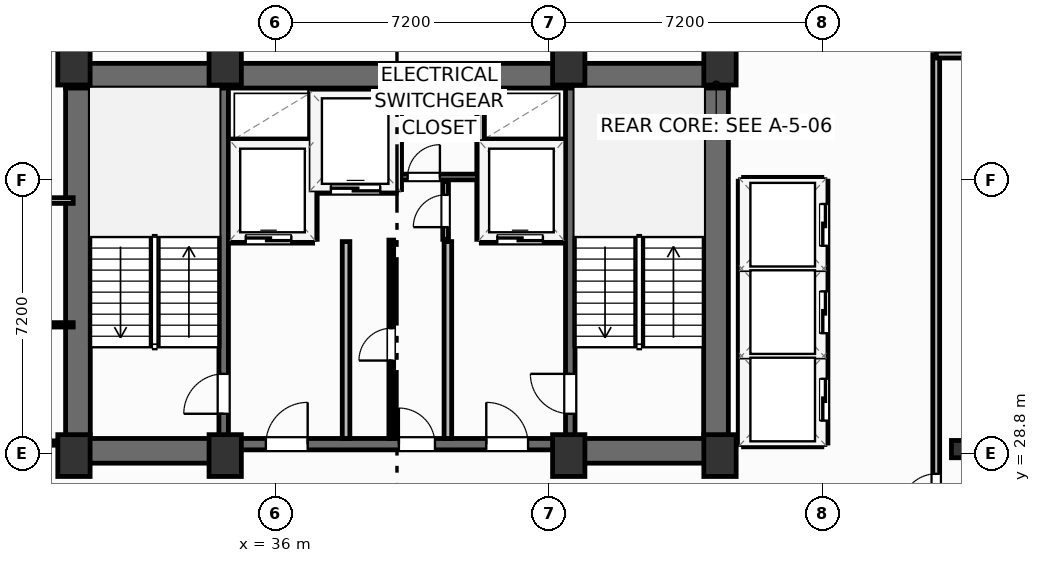
"""IFC4 building model, lengths in metres.
Left out: names, types, materials, properties, quantities, classifications, styles, units other than length and angle.
Written with IfcOpenShell. Run it as: python <this file> out.ifc"""

import sys

from ifc_helpers import new_model, si_unit, direction, frame, frame_2d, origin, origin_2d, place, context, subcontext, project, spatial, rectangle, i_section, extrude, element, fill, save


model = new_model("IFC4")
c1 = context("Model", 3, precision=1e-05, world=origin(), true_north=direction((0.0, 1.0)))
c2 = subcontext(c1, "Body", "Model", "MODEL_VIEW")
j1 = project(units=[si_unit("LENGTHUNIT", "METRE"), si_unit("PLANEANGLEUNIT", "RADIAN")], contexts=[c1])
p1 = place(None, origin())
s1 = spatial("IfcSite", under=j1, at=p1, CompositionType="ELEMENT")
p2 = place(p1, origin())
s2 = spatial("IfcBuilding", under=s1, at=p2, CompositionType="ELEMENT")
p3 = place(p2, frame((0.0, 0.0, 178.3)))
s3 = spatial("IfcBuildingStorey", under=s2, at=p3, CompositionType="ELEMENT", Elevation=178.3)
for number, where, z_axis, x_axis in (
    (1, (30.7, 28.75, 0.0), (0.0, 0.0, 1.0), (1.0, 0.0, 0.0)),
    (2, (34.68, 28.75, 0.0), (0.0, 0.0, 1.0), (1.0, 0.0, 0.0)),
    (3, (43.72, 28.75, 0.0), (0.0, 0.0, 1.0), (1.0, 0.0, 0.0)),
    (4, (47.7, 28.75, 0.0), (0.0, 0.0, 1.0), (1.0, 0.0, 0.0)),
    (5, (30.7, 39.05, 0.0), (0.0, 0.0, 1.0), (1.0, 0.0, 0.0)),
    (6, (34.68, 39.05, 0.0), (0.0, 0.0, 1.0), (1.0, 0.0, 0.0)),
    (7, (43.72, 39.05, 0.0), (0.0, 0.0, 1.0), (1.0, 0.0, 0.0)),
    (8, (47.7, 39.05, 0.0), (0.0, 0.0, 1.0), (1.0, 0.0, 0.0)),
):
    element("IfcColumn", number, at=place(p3, frame(where, z_axis=z_axis, x_axis=x_axis)), inside=s3, PredefinedType="COLUMN", context=c2, shape_type="SweptSolid", body=[
        extrude(rectangle(XDim=0.85, YDim=1.1, at=origin_2d()), origin(), (0.0, 0.0, 1.0), 3.7),
    ])
p4 = place(p3, frame((54.0, 28.92, 0.0), z_axis=(0.0, 0.0, 1.0), x_axis=(1.0, 0.0, 0.0)))
e9 = element("IfcColumn", 9, at=p4, inside=s3, PredefinedType="COLUMN", context=c2, shape_type="SweptSolid", body=[
    extrude(i_section(OverallWidth=0.418, OverallDepth=0.455, WebThickness=0.042, FlangeThickness=0.068, FilletRadius=0.025, at=origin_2d()), origin(), (0.0, 0.0, 1.0), 3.7),
])
p5 = place(p3, frame((30.48, 38.745, 0.0), z_axis=(0.0, 0.0, 1.0), x_axis=(1.0, 0.0, 0.0)))
e10 = element("IfcWall", 10, at=p5, inside=s3, PredefinedType="SHEAR", context=c2, shape_type="SweptSolid", body=[
    extrude(rectangle(XDim=17.44, YDim=0.65, at=frame_2d((8.72, 0.0))), origin(), (0.0, 0.0, 1.0), 3.45),
])
for number, where, z_axis, x_axis in (
    (11, (30.805, 29.2, 0.0), (0.0, 0.0, 1.0), (0.0, 1.0, 0.0)),
    (12, (47.595, 29.2, 0.0), (0.0, 0.0, 1.0), (0.0, 1.0, 0.0)),
):
    element("IfcWall", number, at=place(p3, frame(where, z_axis=z_axis, x_axis=x_axis)), inside=s3, PredefinedType="SHEAR", context=c2, shape_type="SweptSolid", body=[
        extrude(rectangle(XDim=9.22, YDim=0.65, at=frame_2d((4.61, 0.0))), origin(), (0.0, 0.0, 1.0), 3.45),
    ])
p6 = place(p3, frame((30.48, 28.875, 0.0), z_axis=(0.0, 0.0, 1.0), x_axis=(1.0, 0.0, 0.0)))
e13 = element("IfcWall", 13, at=p6, inside=s3, PredefinedType="SHEAR", context=c2, shape_type="SweptSolid", body=[
    extrude(rectangle(XDim=4.32, YDim=0.65, at=frame_2d((2.16, 0.0))), origin(), (0.0, 0.0, 1.0), 3.45),
])
p7 = place(p3, frame((43.6, 28.875, 0.0), z_axis=(0.0, 0.0, 1.0), x_axis=(1.0, 0.0, 0.0)))
e14 = element("IfcWall", 14, at=p7, inside=s3, PredefinedType="SHEAR", context=c2, shape_type="SweptSolid", body=[
    extrude(rectangle(XDim=4.32, YDim=0.65, at=frame_2d((2.16, 0.0))), origin(), (0.0, 0.0, 1.0), 3.45),
])
p8 = place(p3, frame((34.8, 29.05, 0.0), z_axis=(0.0, 0.0, 1.0), x_axis=(1.0, 0.0, 0.0)))
e15 = element("IfcWall", 15, at=p8, inside=s3, PredefinedType="SHEAR", context=c2, shape_type="SweptSolid", body=[
    extrude(rectangle(XDim=8.8, YDim=0.3, at=frame_2d((4.4, 0.0))), origin(), (0.0, 0.0, 1.0), 3.45),
])
p9 = place(p8, frame((0.95, 0.0, 0.0)))
e16 = element("IfcOpeningElement", 16, at=p9, cuts=e15, PredefinedType="OPENING", context=c2, shape_type="SweptSolid", body=[
    extrude(rectangle(XDim=1.1, YDim=2.15, at=frame_2d((0.55, 1.075))), frame((0.0, 0.16, 0.0), z_axis=(0.0, -1.0, 0.0), x_axis=(1.0, 0.0, 0.0)), (0.0, 0.0, 1.0), 0.32),
])
p10 = place(p8, frame((6.75, 0.0, 0.0)))
e17 = element("IfcOpeningElement", 17, at=p10, cuts=e15, PredefinedType="OPENING", context=c2, shape_type="SweptSolid", body=[
    extrude(rectangle(XDim=1.1, YDim=2.15, at=frame_2d((0.55, 1.075))), frame((0.0, 0.16, 0.0), z_axis=(0.0, -1.0, 0.0), x_axis=(1.0, 0.0, 0.0)), (0.0, 0.0, 1.0), 0.32),
])
p11 = place(p8, frame((4.45, 0.0, 0.0)))
e18 = element("IfcOpeningElement", 18, at=p11, cuts=e15, PredefinedType="OPENING", context=c2, shape_type="SweptSolid", body=[
    extrude(rectangle(XDim=0.95, YDim=2.15, at=frame_2d((0.475, 1.075))), frame((0.0, 0.16, 0.0), z_axis=(0.0, -1.0, 0.0), x_axis=(1.0, 0.0, 0.0)), (0.0, 0.0, 1.0), 0.32),
])
p12 = place(p3, frame((34.64, 29.2, 0.0), z_axis=(0.0, 0.0, 1.0), x_axis=(0.0, 1.0, 0.0)))
e19 = element("IfcWall", 19, at=p12, inside=s3, PredefinedType="SHEAR", context=c2, shape_type="SweptSolid", body=[
    extrude(rectangle(XDim=9.22, YDim=0.25, at=frame_2d((4.61, 0.0))), origin(), (0.0, 0.0, 1.0), 3.45),
])
p13 = place(p12, frame((0.65, 0.0, 0.0)))
e20 = element("IfcOpeningElement", 20, at=p13, cuts=e19, PredefinedType="OPENING", context=c2, shape_type="SweptSolid", body=[
    extrude(rectangle(XDim=1.05, YDim=2.15, at=frame_2d((0.525, 1.075))), frame((0.0, 0.135, 0.0), z_axis=(0.0, -1.0, 0.0), x_axis=(1.0, 0.0, 0.0)), (0.0, 0.0, 1.0), 0.27),
])
p14 = place(p3, frame((43.76, 29.2, 0.0), z_axis=(0.0, 0.0, 1.0), x_axis=(0.0, 1.0, 0.0)))
e21 = element("IfcWall", 21, at=p14, inside=s3, PredefinedType="SHEAR", context=c2, shape_type="SweptSolid", body=[
    extrude(rectangle(XDim=9.22, YDim=0.25, at=frame_2d((4.61, 0.0))), origin(), (0.0, 0.0, 1.0), 3.45),
])
p15 = place(p14, frame((0.65, 0.0, 0.0)))
e22 = element("IfcOpeningElement", 22, at=p15, cuts=e21, PredefinedType="OPENING", context=c2, shape_type="SweptSolid", body=[
    extrude(rectangle(XDim=1.05, YDim=2.15, at=frame_2d((0.525, 1.075))), frame((0.0, 0.135, 0.0), z_axis=(0.0, -1.0, 0.0), x_axis=(1.0, 0.0, 0.0)), (0.0, 0.0, 1.0), 0.27),
])
p16 = place(p3, frame((53.39, 19.28, 0.0), z_axis=(0.0, 0.0, 1.0), x_axis=(0.0, 1.0, 0.0)))
e23 = element("IfcWall", 23, at=p16, inside=s3, PredefinedType="PARTITIONING", context=c2, shape_type="SweptSolid", body=[
    extrude(rectangle(XDim=20.02, YDim=0.18, at=frame_2d((10.01, 0.0))), origin(), (0.0, 0.0, 1.0), 3.45),
])
p17 = place(p16, frame((8.07, 0.0, 0.0)))
e24 = element("IfcOpeningElement", 24, at=p17, cuts=e23, PredefinedType="OPENING", context=c2, shape_type="SweptSolid", body=[
    extrude(rectangle(XDim=0.92, YDim=2.05, at=frame_2d((0.46, 1.025))), frame((0.0, 0.1, 0.0), z_axis=(0.0, -1.0, 0.0), x_axis=(1.0, 0.0, 0.0)), (0.0, 0.0, 1.0), 0.2),
])
p18 = place(p3, frame((53.39, 39.3, 0.0), z_axis=(0.0, 0.0, 1.0), x_axis=(1.0, 0.0, 0.0)))
e25 = element("IfcWall", 25, at=p18, inside=s3, PredefinedType="PARTITIONING", context=c2, shape_type="SweptSolid", body=[
    extrude(rectangle(XDim=19.49, YDim=0.18, at=frame_2d((9.745, 0.0))), origin(), (0.0, 0.0, 1.0), 3.45),
])
for number, where, z_axis, x_axis in (
    (26, (37.86, 29.2, 0.0), (0.0, 0.0, 1.0), (0.0, 1.0, 0.0)),
    (27, (40.54, 29.2, 0.0), (0.0, 0.0, 1.0), (0.0, 1.0, 0.0)),
):
    element("IfcWall", number, at=place(p3, frame(where, z_axis=z_axis, x_axis=x_axis)), inside=s3, PredefinedType="PARTITIONING", context=c2, shape_type="SweptSolid", body=[
        extrude(rectangle(XDim=5.18, YDim=0.2, at=frame_2d((2.59, 0.0))), origin(), (0.0, 0.0, 1.0), 3.45),
    ])
p19 = place(p3, frame((34.8, 34.44, 0.0), z_axis=(0.0, 0.0, 1.0), x_axis=(1.0, 0.0, 0.0)))
e28 = element("IfcWall", 28, at=p19, inside=s3, PredefinedType="PARTITIONING", context=c2, shape_type="SweptSolid", body=[
    extrude(rectangle(XDim=2.18, YDim=0.2, at=frame_2d((1.09, 0.0))), origin(), (0.0, 0.0, 1.0), 3.45),
])
p20 = place(p19, frame((0.42, 0.0, 0.0)))
e29 = element("IfcOpeningElement", 29, at=p20, cuts=e28, PredefinedType="OPENING", context=c2, shape_type="SweptSolid", body=[
    extrude(rectangle(XDim=1.2, YDim=2.2, at=frame_2d((0.6, 1.1))), frame((0.0, 0.11, 0.0), z_axis=(0.0, -1.0, 0.0), x_axis=(1.0, 0.0, 0.0)), (0.0, 0.0, 1.0), 0.22),
])
p21 = place(p3, frame((34.8, 36.98, 0.0), z_axis=(0.0, 0.0, 1.0), x_axis=(1.0, 0.0, 0.0)))
e30 = element("IfcWall", 30, at=p21, inside=s3, PredefinedType="PARTITIONING", context=c2, shape_type="SweptSolid", body=[
    extrude(rectangle(XDim=2.18, YDim=0.2, at=frame_2d((1.09, 0.0))), origin(), (0.0, 0.0, 1.0), 3.45),
])
p22 = place(p3, frame((37.0, 34.44, 0.0), z_axis=(0.0, 0.0, 1.0), x_axis=(0.0, 1.0, 0.0)))
e31 = element("IfcWall", 31, at=p22, inside=s3, PredefinedType="PARTITIONING", context=c2, shape_type="SweptSolid", body=[
    extrude(rectangle(XDim=3.9, YDim=0.2, at=frame_2d((1.95, 0.0))), origin(), (0.0, 0.0, 1.0), 3.45),
])
p23 = place(p3, frame((41.42, 34.44, 0.0), z_axis=(0.0, 0.0, 1.0), x_axis=(1.0, 0.0, 0.0)))
e32 = element("IfcWall", 32, at=p23, inside=s3, PredefinedType="PARTITIONING", context=c2, shape_type="SweptSolid", body=[
    extrude(rectangle(XDim=2.18, YDim=0.2, at=frame_2d((1.09, 0.0))), origin(), (0.0, 0.0, 1.0), 3.45),
])
p24 = place(p23, frame((0.42, 0.0, 0.0)))
e33 = element("IfcOpeningElement", 33, at=p24, cuts=e32, PredefinedType="OPENING", context=c2, shape_type="SweptSolid", body=[
    extrude(rectangle(XDim=1.2, YDim=2.2, at=frame_2d((0.6, 1.1))), frame((0.0, 0.11, 0.0), z_axis=(0.0, -1.0, 0.0), x_axis=(1.0, 0.0, 0.0)), (0.0, 0.0, 1.0), 0.22),
])
p25 = place(p3, frame((41.42, 36.98, 0.0), z_axis=(0.0, 0.0, 1.0), x_axis=(1.0, 0.0, 0.0)))
e34 = element("IfcWall", 34, at=p25, inside=s3, PredefinedType="PARTITIONING", context=c2, shape_type="SweptSolid", body=[
    extrude(rectangle(XDim=2.18, YDim=0.2, at=frame_2d((1.09, 0.0))), origin(), (0.0, 0.0, 1.0), 3.45),
])
p26 = place(p3, frame((41.4, 34.44, 0.0), z_axis=(0.0, 0.0, 1.0), x_axis=(0.0, 1.0, 0.0)))
e35 = element("IfcWall", 35, at=p26, inside=s3, PredefinedType="PARTITIONING", context=c2, shape_type="SweptSolid", body=[
    extrude(rectangle(XDim=3.9, YDim=0.2, at=frame_2d((1.95, 0.0))), origin(), (0.0, 0.0, 1.0), 3.45),
])
p27 = place(p3, frame((37.06, 35.75, 0.0), z_axis=(0.0, 0.0, 1.0), x_axis=(1.0, 0.0, 0.0)))
e36 = element("IfcWall", 36, at=p27, inside=s3, PredefinedType="PARTITIONING", context=c2, shape_type="SweptSolid", body=[
    extrude(rectangle(XDim=2.12, YDim=0.2, at=frame_2d((1.06, 0.0))), origin(), (0.0, 0.0, 1.0), 3.45),
])
p28 = place(p27, frame((0.4, 0.0, 0.0)))
e37 = element("IfcOpeningElement", 37, at=p28, cuts=e36, PredefinedType="OPENING", context=c2, shape_type="SweptSolid", body=[
    extrude(rectangle(XDim=1.3, YDim=2.2, at=frame_2d((0.65, 1.1))), frame((0.0, 0.11, 0.0), z_axis=(0.0, -1.0, 0.0), x_axis=(1.0, 0.0, 0.0)), (0.0, 0.0, 1.0), 0.22),
])
p29 = place(p3, frame((39.22, 35.75, 0.0), z_axis=(0.0, 0.0, 1.0), x_axis=(0.0, 1.0, 0.0)))
e38 = element("IfcWall", 38, at=p29, inside=s3, PredefinedType="PARTITIONING", context=c2, shape_type="SweptSolid", body=[
    extrude(rectangle(XDim=2.59, YDim=0.2, at=frame_2d((1.295, 0.0))), origin(), (0.0, 0.0, 1.0), 3.45),
])
p30 = place(p3, frame((39.3, 36.08, 0.0), z_axis=(0.0, 0.0, 1.0), x_axis=(1.0, 0.0, 0.0)))
e39 = element("IfcWall", 39, at=p30, inside=s3, PredefinedType="PARTITIONING", context=c2, shape_type="SweptSolid", body=[
    extrude(rectangle(XDim=2.02, YDim=0.15, at=frame_2d((1.01, 0.0))), origin(), (0.0, 0.0, 1.0), 3.45),
])
p31 = place(p30, frame((0.18, 0.0, 0.0)))
e40 = element("IfcOpeningElement", 40, at=p31, cuts=e39, PredefinedType="OPENING", context=c2, shape_type="SweptSolid", body=[
    extrude(rectangle(XDim=0.85, YDim=2.05, at=frame_2d((0.425, 1.025))), frame((0.0, 0.085, 0.0), z_axis=(0.0, -1.0, 0.0), x_axis=(1.0, 0.0, 0.0)), (0.0, 0.0, 1.0), 0.17),
])
p32 = place(p3, frame((40.48, 34.44, 0.0), z_axis=(0.0, 0.0, 1.0), x_axis=(0.0, 1.0, 0.0)))
e41 = element("IfcWall", 41, at=p32, inside=s3, PredefinedType="PARTITIONING", context=c2, shape_type="SweptSolid", body=[
    extrude(rectangle(XDim=1.52, YDim=0.15, at=frame_2d((0.76, 0.0))), origin(), (0.0, 0.0, 1.0), 3.45),
])
p33 = place(p32, frame((0.32, 0.0, 0.0)))
e42 = element("IfcOpeningElement", 42, at=p33, cuts=e41, PredefinedType="OPENING", context=c2, shape_type="SweptSolid", body=[
    extrude(rectangle(XDim=0.85, YDim=2.05, at=frame_2d((0.425, 1.025))), frame((0.0, 0.085, 0.0), z_axis=(0.0, -1.0, 0.0), x_axis=(1.0, 0.0, 0.0)), (0.0, 0.0, 1.0), 0.17),
])
p34 = place(p3, frame((39.05, 29.2, 0.0), z_axis=(0.0, 0.0, 1.0), x_axis=(0.0, 1.0, 0.0)))
e43 = element("IfcWall", 43, at=p34, inside=s3, PredefinedType="PARTITIONING", context=c2, shape_type="SweptSolid", body=[
    extrude(rectangle(XDim=5.22, YDim=0.125, at=frame_2d((2.61, 0.0))), origin(), (0.0, 0.0, 1.0), 3.45),
])
p35 = place(p34, frame((2.05, 0.0, 0.0)))
e44 = element("IfcOpeningElement", 44, at=p35, cuts=e43, PredefinedType="OPENING", context=c2, shape_type="SweptSolid", body=[
    extrude(rectangle(XDim=0.85, YDim=2.05, at=frame_2d((0.425, 1.025))), frame((0.0, 0.073, 0.0), z_axis=(0.0, -1.0, 0.0), x_axis=(1.0, 0.0, 0.0)), (0.0, 0.0, 1.0), 0.145),
])
p36 = place(p3, frame((26.8, 32.19, 0.0), z_axis=(0.0, 0.0, 1.0), x_axis=(1.0, 0.0, 0.0)))
e45 = element("IfcWall", 45, at=p36, inside=s3, PredefinedType="PARTITIONING", context=c2, shape_type="SweptSolid", body=[
    extrude(rectangle(XDim=3.88, YDim=0.115, at=frame_2d((1.94, 0.0))), origin(), (0.0, 0.0, 1.0), 3.45),
])
p37 = place(p3, frame((26.78, 29.08, 0.0), z_axis=(0.0, 0.0, 1.0), x_axis=(1.0, 0.0, 0.0)))
e46 = element("IfcWall", 46, at=p37, inside=s3, PredefinedType="PARTITIONING", context=c2, shape_type="SweptSolid", body=[
    extrude(rectangle(XDim=3.7, YDim=0.115, at=frame_2d((1.85, 0.0))), origin(), (0.0, 0.0, 1.0), 3.45),
])
p38 = place(p3, frame((26.78, 35.46, 0.0), z_axis=(0.0, 0.0, 1.0), x_axis=(1.0, 0.0, 0.0)))
e47 = element("IfcWall", 47, at=p38, inside=s3, PredefinedType="PARTITIONING", context=c2, shape_type="SweptSolid", body=[
    extrude(rectangle(XDim=3.9, YDim=0.15, at=frame_2d((1.95, 0.0))), origin(), (0.0, 0.0, 1.0), 3.45),
])
for number, where, z_axis, x_axis in (
    (48, (48.32, 31.375, 0.0), (0.0, 0.0, 1.0), (1.0, 0.0, 0.0)),
    (49, (48.32, 33.675, 0.0), (0.0, 0.0, 1.0), (1.0, 0.0, 0.0)),
):
    element("IfcWall", number, at=place(p3, frame(where, z_axis=z_axis, x_axis=x_axis)), inside=s3, PredefinedType="PARTITIONING", context=c2, shape_type="SweptSolid", body=[
        extrude(rectangle(XDim=2.06, YDim=0.2, at=frame_2d((1.03, 0.0))), origin(), (0.0, 0.0, 1.0), 3.45),
    ])
p39 = place(p3, frame((48.32, 29.08, 0.0), z_axis=(0.0, 0.0, 1.0), x_axis=(1.0, 0.0, 0.0)))
e50 = element("IfcWall", 50, at=p39, inside=s3, PredefinedType="PARTITIONING", context=c2, shape_type="SweptSolid", body=[
    extrude(rectangle(XDim=2.06, YDim=0.2, at=frame_2d((1.03, 0.0))), origin(), (0.0, 0.0, 1.0), 2.662),
])
p40 = place(p3, frame((48.32, 35.97, 0.0), z_axis=(0.0, 0.0, 1.0), x_axis=(1.0, 0.0, 0.0)))
e51 = element("IfcWall", 51, at=p40, inside=s3, PredefinedType="PARTITIONING", context=c2, shape_type="SweptSolid", body=[
    extrude(rectangle(XDim=2.06, YDim=0.2, at=frame_2d((1.03, 0.0))), origin(), (0.0, 0.0, 1.0), 3.45),
])
p41 = place(p3, frame((48.28, 29.08, 0.0), z_axis=(0.0, 0.0, 1.0), x_axis=(0.0, 1.0, 0.0)))
e52 = element("IfcWall", 52, at=p41, inside=s3, PredefinedType="PARTITIONING", context=c2, shape_type="SweptSolid", body=[
    extrude(rectangle(XDim=6.89, YDim=0.2, at=frame_2d((3.445, 0.0))), origin(), (0.0, 0.0, 1.0), 3.45),
])
p42 = place(p3, frame((50.44, 29.08, 0.0), z_axis=(0.0, 0.0, 1.0), x_axis=(0.0, 1.0, 0.0)))
e53 = element("IfcWall", 53, at=p42, inside=s3, PredefinedType="PARTITIONING", context=c2, shape_type="SweptSolid", body=[
    extrude(rectangle(XDim=6.89, YDim=0.2, at=frame_2d((3.445, 0.0))), origin(), (0.0, 0.0, 1.0), 3.45),
])
p43 = place(p42, frame((0.59, 0.0, 0.0)))
e54 = element("IfcOpeningElement", 54, at=p43, cuts=e53, PredefinedType="OPENING", context=c2, shape_type="SweptSolid", body=[
    extrude(rectangle(XDim=1.1, YDim=2.15, at=frame_2d((0.55, 1.075))), frame((0.0, 0.11, 0.0), z_axis=(0.0, -1.0, 0.0), x_axis=(1.0, 0.0, 0.0)), (0.0, 0.0, 1.0), 0.22),
])
p44 = place(p42, frame((2.89, 0.0, 0.0)))
e55 = element("IfcOpeningElement", 55, at=p44, cuts=e53, PredefinedType="OPENING", context=c2, shape_type="SweptSolid", body=[
    extrude(rectangle(XDim=1.1, YDim=2.15, at=frame_2d((0.55, 1.075))), frame((0.0, 0.11, 0.0), z_axis=(0.0, -1.0, 0.0), x_axis=(1.0, 0.0, 0.0)), (0.0, 0.0, 1.0), 0.22),
])
p45 = place(p42, frame((5.19, 0.0, 0.0)))
e56 = element("IfcOpeningElement", 56, at=p45, cuts=e53, PredefinedType="OPENING", context=c2, shape_type="SweptSolid", body=[
    extrude(rectangle(XDim=1.1, YDim=2.15, at=frame_2d((0.55, 1.075))), frame((0.0, 0.11, 0.0), z_axis=(0.0, -1.0, 0.0), x_axis=(1.0, 0.0, 0.0)), (0.0, 0.0, 1.0), 0.22),
])
p46 = place(p17, origin())
e57 = element("IfcDoor", 57, at=p46, inside=s3, OperationType="SINGLE_SWING_LEFT", PredefinedType="DOOR", context=c2, shape_type="SweptSolid", body=[
    extrude(rectangle(XDim=0.92, YDim=2.05, at=frame_2d((0.46, 1.025))), frame((0.0, 0.025, 0.0), z_axis=(0.0, -1.0, 0.0), x_axis=(1.0, 0.0, 0.0)), (0.0, 0.0, 1.0), 0.05),
])
fill(e24, e57)
p47 = place(p13, origin())
e58 = element("IfcDoor", 58, at=p47, inside=s3, OperationType="SINGLE_SWING_LEFT", PredefinedType="DOOR", context=c2, shape_type="SweptSolid", body=[
    extrude(rectangle(XDim=1.05, YDim=2.15, at=frame_2d((0.525, 1.075))), frame((0.0, 0.025, 0.0), z_axis=(0.0, -1.0, 0.0), x_axis=(1.0, 0.0, 0.0)), (0.0, 0.0, 1.0), 0.05),
])
fill(e20, e58)
p48 = place(p15, origin())
e59 = element("IfcDoor", 59, at=p48, inside=s3, OperationType="SINGLE_SWING_RIGHT", PredefinedType="DOOR", context=c2, shape_type="SweptSolid", body=[
    extrude(rectangle(XDim=1.05, YDim=2.15, at=frame_2d((0.525, 1.075))), frame((0.0, 0.025, 0.0), z_axis=(0.0, -1.0, 0.0), x_axis=(1.0, 0.0, 0.0)), (0.0, 0.0, 1.0), 0.05),
])
fill(e22, e59)
p49 = place(p9, origin())
e60 = element("IfcDoor", 60, at=p49, inside=s3, OperationType="SINGLE_SWING_RIGHT", PredefinedType="DOOR", context=c2, shape_type="SweptSolid", body=[
    extrude(rectangle(XDim=1.1, YDim=2.15, at=frame_2d((0.55, 1.075))), frame((0.0, 0.025, 0.0), z_axis=(0.0, -1.0, 0.0), x_axis=(1.0, 0.0, 0.0)), (0.0, 0.0, 1.0), 0.05),
])
fill(e16, e60)
p50 = place(p10, origin())
e61 = element("IfcDoor", 61, at=p50, inside=s3, OperationType="SINGLE_SWING_LEFT", PredefinedType="DOOR", context=c2, shape_type="SweptSolid", body=[
    extrude(rectangle(XDim=1.1, YDim=2.15, at=frame_2d((0.55, 1.075))), frame((0.0, 0.025, 0.0), z_axis=(0.0, -1.0, 0.0), x_axis=(1.0, 0.0, 0.0)), (0.0, 0.0, 1.0), 0.05),
])
fill(e17, e61)
p51 = place(p20, origin())
e62 = element("IfcDoor", 62, at=p51, inside=s3, OperationType="SLIDING_TO_LEFT", PredefinedType="DOOR", context=c2, shape_type="SweptSolid", body=[
    extrude(rectangle(XDim=1.2, YDim=2.2, at=frame_2d((0.6, 1.1))), frame((0.0, 0.025, 0.0), z_axis=(0.0, -1.0, 0.0), x_axis=(1.0, 0.0, 0.0)), (0.0, 0.0, 1.0), 0.05),
])
fill(e29, e62)
p52 = place(p24, origin())
e63 = element("IfcDoor", 63, at=p52, inside=s3, OperationType="SLIDING_TO_LEFT", PredefinedType="DOOR", context=c2, shape_type="SweptSolid", body=[
    extrude(rectangle(XDim=1.2, YDim=2.2, at=frame_2d((0.6, 1.1))), frame((0.0, 0.025, 0.0), z_axis=(0.0, -1.0, 0.0), x_axis=(1.0, 0.0, 0.0)), (0.0, 0.0, 1.0), 0.05),
])
fill(e33, e63)
p53 = place(p28, origin())
e64 = element("IfcDoor", 64, at=p53, inside=s3, OperationType="SLIDING_TO_LEFT", PredefinedType="DOOR", context=c2, shape_type="SweptSolid", body=[
    extrude(rectangle(XDim=1.3, YDim=2.2, at=frame_2d((0.65, 1.1))), frame((0.0, 0.025, 0.0), z_axis=(0.0, -1.0, 0.0), x_axis=(1.0, 0.0, 0.0)), (0.0, 0.0, 1.0), 0.05),
])
fill(e37, e64)
p54 = place(p31, origin())
e65 = element("IfcDoor", 65, at=p54, inside=s3, OperationType="SINGLE_SWING_RIGHT", PredefinedType="DOOR", context=c2, shape_type="SweptSolid", body=[
    extrude(rectangle(XDim=0.85, YDim=2.05, at=frame_2d((0.425, 1.025))), frame((0.0, 0.025, 0.0), z_axis=(0.0, -1.0, 0.0), x_axis=(1.0, 0.0, 0.0)), (0.0, 0.0, 1.0), 0.05),
])
fill(e40, e65)
p55 = place(p33, origin())
e66 = element("IfcDoor", 66, at=p55, inside=s3, OperationType="SINGLE_SWING_LEFT", PredefinedType="DOOR", context=c2, shape_type="SweptSolid", body=[
    extrude(rectangle(XDim=0.85, YDim=2.05, at=frame_2d((0.425, 1.025))), frame((0.0, 0.025, 0.0), z_axis=(0.0, -1.0, 0.0), x_axis=(1.0, 0.0, 0.0)), (0.0, 0.0, 1.0), 0.05),
])
fill(e42, e66)
p56 = place(p35, origin())
e67 = element("IfcDoor", 67, at=p56, inside=s3, OperationType="SINGLE_SWING_LEFT", PredefinedType="DOOR", context=c2, shape_type="SweptSolid", body=[
    extrude(rectangle(XDim=0.85, YDim=2.05, at=frame_2d((0.425, 1.025))), frame((0.0, 0.025, 0.0), z_axis=(0.0, -1.0, 0.0), x_axis=(1.0, 0.0, 0.0)), (0.0, 0.0, 1.0), 0.05),
])
fill(e44, e67)
p57 = place(p11, origin())
e68 = element("IfcDoor", 68, at=p57, inside=s3, OperationType="SINGLE_SWING_LEFT", PredefinedType="DOOR", context=c2, shape_type="SweptSolid", body=[
    extrude(rectangle(XDim=0.95, YDim=2.15, at=frame_2d((0.475, 1.075))), frame((0.0, 0.025, 0.0), z_axis=(0.0, -1.0, 0.0), x_axis=(1.0, 0.0, 0.0)), (0.0, 0.0, 1.0), 0.05),
])
fill(e18, e68)
p58 = place(p43, origin())
e69 = element("IfcDoor", 69, at=p58, inside=s3, OperationType="SLIDING_TO_LEFT", PredefinedType="DOOR", context=c2, shape_type="SweptSolid", body=[
    extrude(rectangle(XDim=1.1, YDim=2.15, at=frame_2d((0.55, 1.075))), frame((0.0, 0.025, 0.0), z_axis=(0.0, -1.0, 0.0), x_axis=(1.0, 0.0, 0.0)), (0.0, 0.0, 1.0), 0.05),
])
fill(e54, e69)
p59 = place(p44, origin())
e70 = element("IfcDoor", 70, at=p59, inside=s3, OperationType="SLIDING_TO_LEFT", PredefinedType="DOOR", context=c2, shape_type="SweptSolid", body=[
    extrude(rectangle(XDim=1.1, YDim=2.15, at=frame_2d((0.55, 1.075))), frame((0.0, 0.025, 0.0), z_axis=(0.0, -1.0, 0.0), x_axis=(1.0, 0.0, 0.0)), (0.0, 0.0, 1.0), 0.05),
])
fill(e55, e70)
p60 = place(p45, origin())
e71 = element("IfcDoor", 71, at=p60, inside=s3, OperationType="SLIDING_TO_LEFT", PredefinedType="DOOR", context=c2, shape_type="SweptSolid", body=[
    extrude(rectangle(XDim=1.1, YDim=2.15, at=frame_2d((0.55, 1.075))), frame((0.0, 0.025, 0.0), z_axis=(0.0, -1.0, 0.0), x_axis=(1.0, 0.0, 0.0)), (0.0, 0.0, 1.0), 0.05),
])
fill(e56, e71)
save(model, sys.argv[1])
